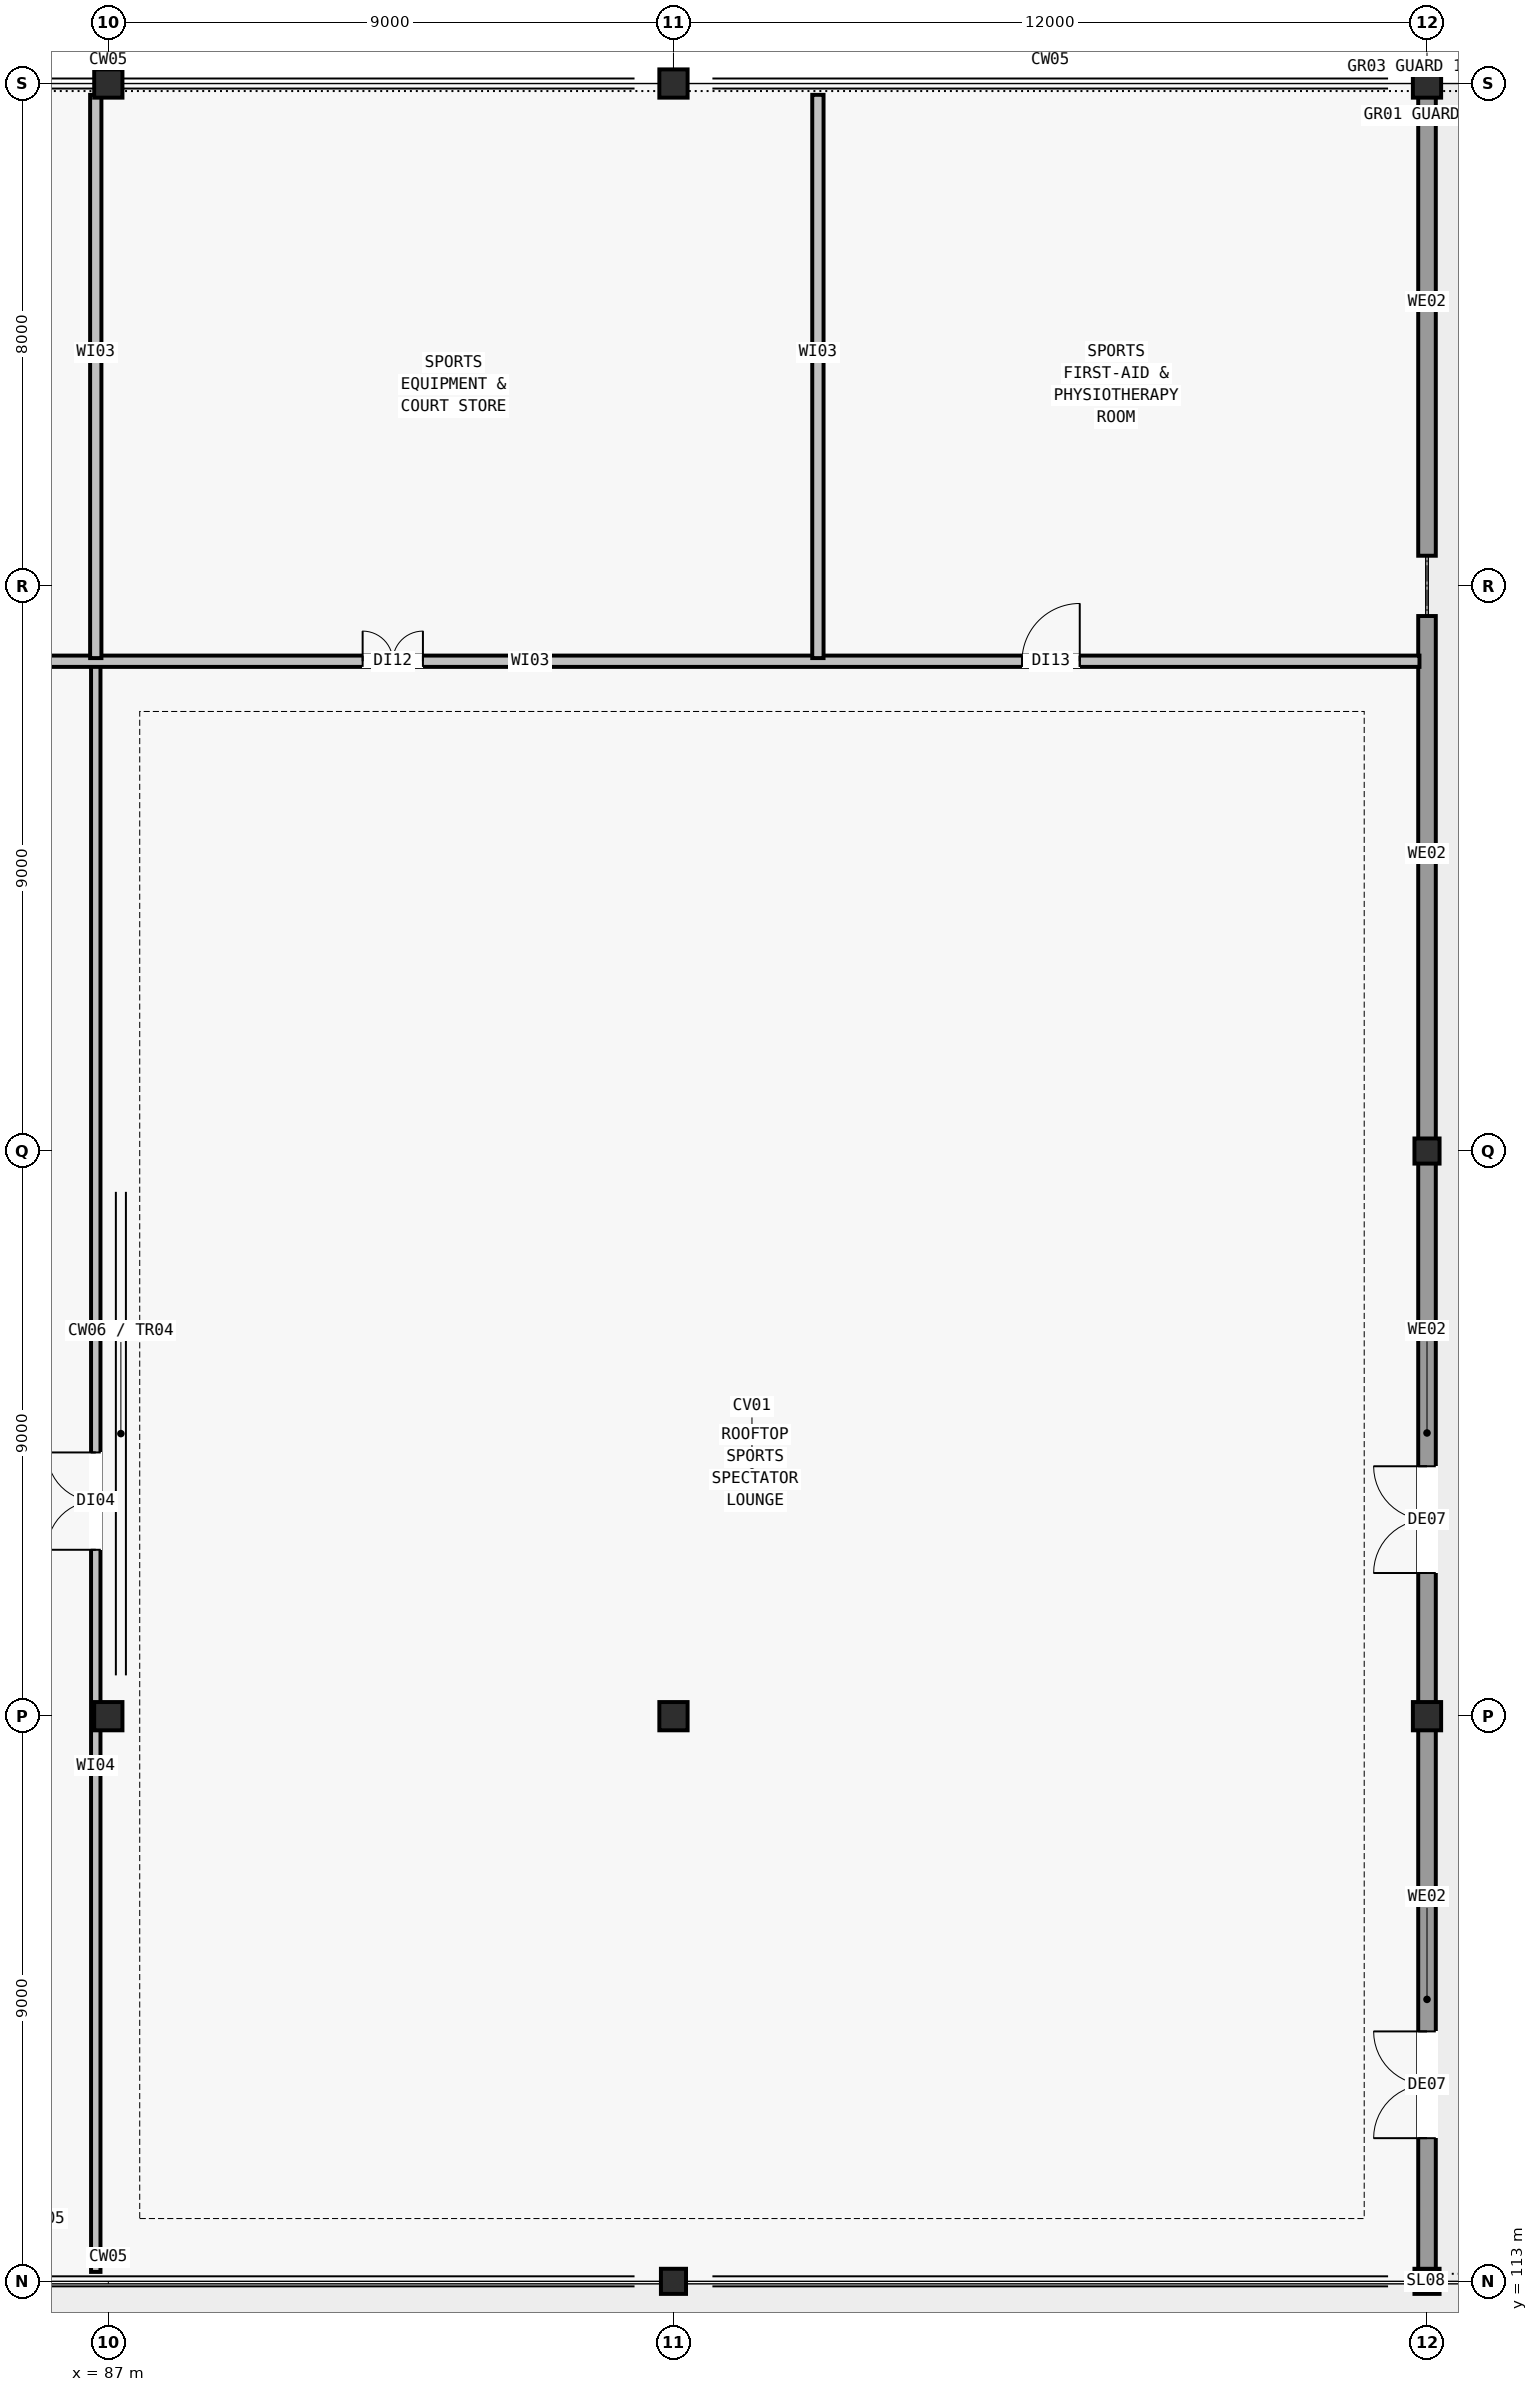
"""IFC4 building model, lengths in metres.
Left out: names, types, materials, properties, quantities, classifications, styles, units other than length and angle.
Written with IfcOpenShell. Run it as: python <this file> out.ifc"""

import sys

from ifc_helpers import new_model, si_unit, direction, frame, frame_2d, origin, origin_2d, place, context, subcontext, project, spatial, rectangle, i_section, extrude, element, fill, save


model = new_model("IFC4")
c1 = context("Model", 3, precision=1e-05, world=origin(), true_north=direction((0.0, 1.0)))
c2 = subcontext(c1, "Body", "Model", "MODEL_VIEW")
j1 = project(units=[si_unit("LENGTHUNIT", "METRE"), si_unit("PLANEANGLEUNIT", "RADIAN")], contexts=[c1])
p1 = place(None, origin())
s1 = spatial("IfcSite", under=j1, at=p1, CompositionType="ELEMENT")
p2 = place(p1, origin())
s2 = spatial("IfcBuilding", under=s1, at=p2, CompositionType="ELEMENT")
p3 = place(p2, frame((0.0, 0.0, 25.1)))
s3 = spatial("IfcBuildingStorey", under=s2, at=p3, CompositionType="ELEMENT", Elevation=25.1)
p4 = place(p3, frame((87.0, 122.0, 0.0), z_axis=(0.0, 0.0, 1.0), x_axis=(1.0, 0.0, 0.0)))
e1 = element("IfcColumn", 1, at=p4, inside=s3, PredefinedType="COLUMN", context=c2, shape_type="SweptSolid", body=[
    extrude(i_section(OverallWidth=0.45, OverallDepth=0.45, WebThickness=0.016, FlangeThickness=0.026, FilletRadius=0.022, at=origin_2d()), origin(), (0.0, 0.0, 1.0), 5.122),
])
p5 = place(p3, frame((87.0, 148.0, 0.0), z_axis=(0.0, 0.0, 1.0), x_axis=(1.0, 0.0, 0.0)))
e2 = element("IfcColumn", 2, at=p5, inside=s3, PredefinedType="COLUMN", context=c2, shape_type="SweptSolid", body=[
    extrude(i_section(OverallWidth=0.45, OverallDepth=0.45, WebThickness=0.016, FlangeThickness=0.026, FilletRadius=0.022, at=origin_2d()), origin(), (0.0, 0.0, 1.0), 2.99),
])
p6 = place(p3, frame((96.0, 122.0, 0.0), z_axis=(0.0, 0.0, 1.0), x_axis=(1.0, 0.0, 0.0)))
e3 = element("IfcColumn", 3, at=p6, inside=s3, PredefinedType="COLUMN", context=c2, shape_type="SweptSolid", body=[
    extrude(i_section(OverallWidth=0.45, OverallDepth=0.45, WebThickness=0.016, FlangeThickness=0.026, FilletRadius=0.022, at=origin_2d()), origin(), (0.0, 0.0, 1.0), 5.122),
])
p7 = place(p3, frame((96.0, 148.0, 0.0), z_axis=(0.0, 0.0, 1.0), x_axis=(1.0, 0.0, 0.0)))
e4 = element("IfcColumn", 4, at=p7, inside=s3, PredefinedType="COLUMN", context=c2, shape_type="SweptSolid", body=[
    extrude(i_section(OverallWidth=0.45, OverallDepth=0.45, WebThickness=0.016, FlangeThickness=0.026, FilletRadius=0.022, at=origin_2d()), origin(), (0.0, 0.0, 1.0), 2.99),
])
p8 = place(p3, frame((108.0, 122.0, 0.0), z_axis=(0.0, 0.0, 1.0), x_axis=(1.0, 0.0, 0.0)))
e5 = element("IfcColumn", 5, at=p8, inside=s3, PredefinedType="COLUMN", context=c2, shape_type="SweptSolid", body=[
    extrude(i_section(OverallWidth=0.45, OverallDepth=0.45, WebThickness=0.016, FlangeThickness=0.026, FilletRadius=0.022, at=origin_2d()), origin(), (0.0, 0.0, 1.0), 5.122),
])
p9 = place(p3, frame((108.0, 131.0, 0.0), z_axis=(0.0, 0.0, 1.0), x_axis=(1.0, 0.0, 0.0)))
e6 = element("IfcColumn", 6, at=p9, inside=s3, PredefinedType="COLUMN", context=c2, shape_type="SweptSolid", body=[
    extrude(i_section(OverallWidth=0.4, OverallDepth=0.4, WebThickness=0.013, FlangeThickness=0.021, FilletRadius=0.022, at=origin_2d()), origin(), (0.0, 0.0, 1.0), 5.937),
])
p10 = place(p3, frame((108.0, 148.0, 0.0), z_axis=(0.0, 0.0, 1.0), x_axis=(1.0, 0.0, 0.0)))
e7 = element("IfcColumn", 7, at=p10, inside=s3, PredefinedType="COLUMN", context=c2, shape_type="SweptSolid", body=[
    extrude(i_section(OverallWidth=0.45, OverallDepth=0.45, WebThickness=0.016, FlangeThickness=0.026, FilletRadius=0.022, at=origin_2d()), origin(), (0.0, 0.0, 1.0), 2.99),
])
for number, where, z_axis, x_axis in (
    (8, (96.0, 113.0, 0.0), (0.0, 0.0, 1.0), (1.0, 0.0, 0.0)),
    (9, (108.0, 113.0, 0.0), (0.0, 0.0, 1.0), (1.0, 0.0, 0.0)),
):
    element("IfcColumn", number, at=place(p3, frame(where, z_axis=z_axis, x_axis=x_axis)), inside=s3, PredefinedType="COLUMN", context=c2, shape_type="SweptSolid", body=[
        extrude(i_section(OverallWidth=0.4, OverallDepth=0.4, WebThickness=0.013, FlangeThickness=0.021, FilletRadius=0.022, at=origin_2d()), origin(), (0.0, 0.0, 1.0), 2.99),
    ])
p11 = place(p3, frame((108.0, 113.185, 0.0), z_axis=(0.0, 0.0, 1.0), x_axis=(0.0, 1.0, 0.0)))
e10 = element("IfcWall", 10, at=p11, inside=s3, PredefinedType="STANDARD", context=c2, shape_type="SweptSolid", body=[
    extrude(rectangle(XDim=8.61, YDim=0.28, at=frame_2d((4.305, 0.0))), origin(), (0.0, 0.0, 1.0), 2.65),
])
p12 = place(p11, frame((2.095, 0.0, 0.0)))
e11 = element("IfcOpeningElement", 11, at=p12, cuts=e10, PredefinedType="OPENING", context=c2, shape_type="SweptSolid", body=[
    extrude(rectangle(XDim=1.7, YDim=2.2, at=frame_2d((0.85, 1.1))), frame((0.0, 0.15, 0.0), z_axis=(0.0, -1.0, 0.0), x_axis=(1.0, 0.0, 0.0)), (0.0, 0.0, 1.0), 0.3),
])
p13 = place(p3, frame((108.0, 122.205, 0.0), z_axis=(0.0, 0.0, 1.0), x_axis=(0.0, 1.0, 0.0)))
e12 = element("IfcWall", 12, at=p13, inside=s3, PredefinedType="STANDARD", context=c2, shape_type="SweptSolid", body=[
    extrude(rectangle(XDim=8.61, YDim=0.28, at=frame_2d((4.305, 0.0))), origin(), (0.0, 0.0, 1.0), 2.65),
])
p14 = place(p13, frame((2.075, 0.0, 0.0)))
e13 = element("IfcOpeningElement", 13, at=p14, cuts=e12, PredefinedType="OPENING", context=c2, shape_type="SweptSolid", body=[
    extrude(rectangle(XDim=1.7, YDim=2.2, at=frame_2d((0.85, 1.1))), frame((0.0, 0.15, 0.0), z_axis=(0.0, -1.0, 0.0), x_axis=(1.0, 0.0, 0.0)), (0.0, 0.0, 1.0), 0.3),
])
p15 = place(p3, frame((108.0, 131.185, 0.0), z_axis=(0.0, 0.0, 1.0), x_axis=(0.0, 1.0, 0.0)))
e14 = element("IfcWall", 14, at=p15, inside=s3, PredefinedType="STANDARD", context=c2, shape_type="SweptSolid", body=[
    extrude(rectangle(XDim=8.335, YDim=0.28, at=frame_2d((4.167, 0.0))), origin(), (0.0, 0.0, 1.0), 2.65),
])
p16 = place(p3, frame((108.0, 140.48, 0.0), z_axis=(0.0, 0.0, 1.0), x_axis=(0.0, 1.0, 0.0)))
e15 = element("IfcWall", 15, at=p16, inside=s3, PredefinedType="STANDARD", context=c2, shape_type="SweptSolid", body=[
    extrude(rectangle(XDim=7.315, YDim=0.28, at=frame_2d((3.657, 0.0))), origin(), (0.0, 0.0, 1.0), 2.65),
])
p17 = place(p3, frame((86.8, 113.15, 0.0), z_axis=(0.0, 0.0, 1.0), x_axis=(0.0, 1.0, 0.0)))
e16 = element("IfcWall", 16, at=p17, inside=s3, PredefinedType="PARTITIONING", context=c2, shape_type="SweptSolid", body=[
    extrude(rectangle(XDim=25.6, YDim=0.15, at=frame_2d((12.8, 0.0))), origin(), (0.0, 0.0, 1.0), 2.65),
])
p18 = place(p17, frame((11.5, 0.0, 0.0)))
e17 = element("IfcOpeningElement", 17, at=p18, cuts=e16, PredefinedType="OPENING", context=c2, shape_type="SweptSolid", body=[
    extrude(rectangle(XDim=1.55, YDim=2.2, at=frame_2d((0.775, 1.1))), frame((0.0, 0.085, 0.0), z_axis=(0.0, -1.0, 0.0), x_axis=(1.0, 0.0, 0.0)), (0.0, 0.0, 1.0), 0.17),
])
p19 = place(p3, frame((38.05, 138.8, 0.0), z_axis=(0.0, 0.0, 1.0), x_axis=(1.0, 0.0, 0.0)))
e18 = element("IfcWall", 18, at=p19, inside=s3, PredefinedType="PARTITIONING", context=c2, shape_type="SweptSolid", body=[
    extrude(rectangle(XDim=69.83, YDim=0.18, at=frame_2d((34.915, 0.0))), origin(), (0.0, 0.0, 1.0), 2.65),
])
p20 = place(p19, frame((6.5, 0.0, 0.0)))
e19 = element("IfcOpeningElement", 19, at=p20, cuts=e18, PredefinedType="OPENING", context=c2, shape_type="SweptSolid", body=[
    extrude(rectangle(XDim=1.02, YDim=2.1, at=frame_2d((0.51, 1.05))), frame((0.0, 0.1, 0.0), z_axis=(0.0, -1.0, 0.0), x_axis=(1.0, 0.0, 0.0)), (0.0, 0.0, 1.0), 0.2),
])
p21 = place(p19, frame((31.0, 0.0, 0.0)))
e20 = element("IfcOpeningElement", 20, at=p21, cuts=e18, PredefinedType="OPENING", context=c2, shape_type="SweptSolid", body=[
    extrude(rectangle(XDim=1.02, YDim=2.1, at=frame_2d((0.51, 1.05))), frame((0.0, 0.1, 0.0), z_axis=(0.0, -1.0, 0.0), x_axis=(1.0, 0.0, 0.0)), (0.0, 0.0, 1.0), 0.2),
])
p22 = place(p19, frame((53.0, 0.0, 0.0)))
e21 = element("IfcOpeningElement", 21, at=p22, cuts=e18, PredefinedType="OPENING", context=c2, shape_type="SweptSolid", body=[
    extrude(rectangle(XDim=0.96, YDim=2.1, at=frame_2d((0.48, 1.05))), frame((0.0, 0.1, 0.0), z_axis=(0.0, -1.0, 0.0), x_axis=(1.0, 0.0, 0.0)), (0.0, 0.0, 1.0), 0.2),
])
p23 = place(p19, frame((63.5, 0.0, 0.0)))
e22 = element("IfcOpeningElement", 22, at=p23, cuts=e18, PredefinedType="OPENING", context=c2, shape_type="SweptSolid", body=[
    extrude(rectangle(XDim=0.92, YDim=2.05, at=frame_2d((0.46, 1.025))), frame((0.0, 0.1, 0.0), z_axis=(0.0, -1.0, 0.0), x_axis=(1.0, 0.0, 0.0)), (0.0, 0.0, 1.0), 0.2),
])
for number, where, z_axis, x_axis in (
    (23, (86.8, 138.85, 0.0), (0.0, 0.0, 1.0), (0.0, 1.0, 0.0)),
    (24, (98.3, 138.85, 0.0), (0.0, 0.0, 1.0), (0.0, 1.0, 0.0)),
):
    element("IfcWall", number, at=place(p3, frame(where, z_axis=z_axis, x_axis=x_axis)), inside=s3, PredefinedType="PARTITIONING", context=c2, shape_type="SweptSolid", body=[
        extrude(rectangle(XDim=8.97, YDim=0.18, at=frame_2d((4.485, 0.0))), origin(), (0.0, 0.0, 1.0), 2.65),
    ])
p24 = place(p12, origin())
e25 = element("IfcDoor", 25, at=p24, inside=s3, OperationType="DOUBLE_SWING_LEFT", PredefinedType="DOOR", context=c2, shape_type="SweptSolid", body=[
    extrude(rectangle(XDim=1.7, YDim=2.2, at=frame_2d((0.85, 1.1))), frame((0.0, 0.025, 0.0), z_axis=(0.0, -1.0, 0.0), x_axis=(1.0, 0.0, 0.0)), (0.0, 0.0, 1.0), 0.05),
])
fill(e11, e25)
p25 = place(p14, origin())
e26 = element("IfcDoor", 26, at=p25, inside=s3, OperationType="DOUBLE_SWING_LEFT", PredefinedType="DOOR", context=c2, shape_type="SweptSolid", body=[
    extrude(rectangle(XDim=1.7, YDim=2.2, at=frame_2d((0.85, 1.1))), frame((0.0, 0.025, 0.0), z_axis=(0.0, -1.0, 0.0), x_axis=(1.0, 0.0, 0.0)), (0.0, 0.0, 1.0), 0.05),
])
fill(e13, e26)
p26 = place(p18, origin())
e27 = element("IfcDoor", 27, at=p26, inside=s3, OperationType="DOUBLE_SWING_LEFT", PredefinedType="DOOR", context=c2, shape_type="SweptSolid", body=[
    extrude(rectangle(XDim=1.55, YDim=2.2, at=frame_2d((0.775, 1.1))), frame((0.0, 0.025, 0.0), z_axis=(0.0, -1.0, 0.0), x_axis=(1.0, 0.0, 0.0)), (0.0, 0.0, 1.0), 0.05),
])
fill(e17, e27)
p27 = place(p22, origin())
e28 = element("IfcDoor", 28, at=p27, inside=s3, OperationType="DOUBLE_SWING_LEFT", PredefinedType="DOOR", context=c2, shape_type="SweptSolid", body=[
    extrude(rectangle(XDim=0.96, YDim=2.1, at=frame_2d((0.48, 1.05))), frame((0.0, 0.025, 0.0), z_axis=(0.0, -1.0, 0.0), x_axis=(1.0, 0.0, 0.0)), (0.0, 0.0, 1.0), 0.05),
])
fill(e21, e28)
p28 = place(p23, origin())
e29 = element("IfcDoor", 29, at=p28, inside=s3, OperationType="SINGLE_SWING_RIGHT", PredefinedType="DOOR", context=c2, shape_type="SweptSolid", body=[
    extrude(rectangle(XDim=0.92, YDim=2.05, at=frame_2d((0.46, 1.025))), frame((0.0, 0.025, 0.0), z_axis=(0.0, -1.0, 0.0), x_axis=(1.0, 0.0, 0.0)), (0.0, 0.0, 1.0), 0.05),
])
fill(e22, e29)
save(model, sys.argv[1])
